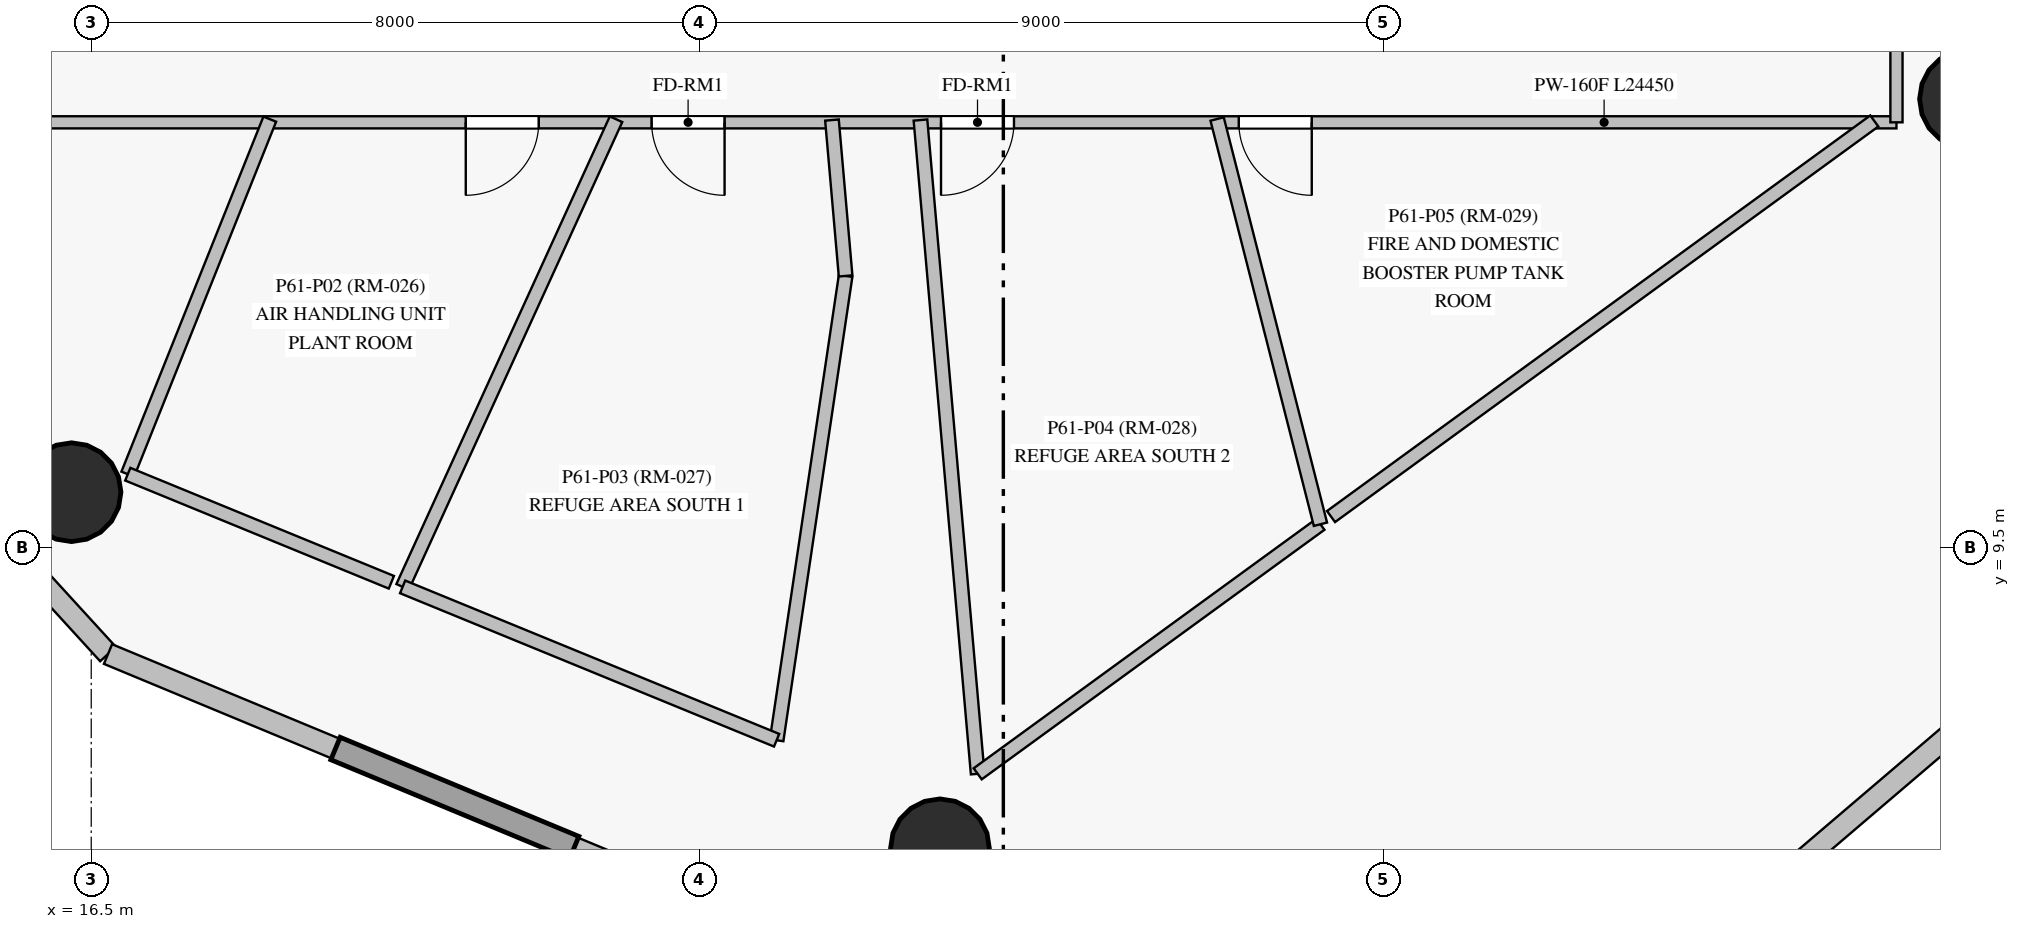
"""IFC4 building model, lengths in metres.
Left out: names, types, materials, properties, quantities, classifications, styles, units other than length and angle.
Written with IfcOpenShell. Run it as: python <this file> out.ifc"""

import sys

from ifc_helpers import new_model, si_unit, direction, frame, frame_2d, origin, origin_with_axes, origin_2d, place, context, subcontext, project, spatial, rectangle, circle, extrude, source, transform, mapped, element, fill, save


model = new_model("IFC4")
c1 = context("Model", 3, precision=1e-05, world=origin(), true_north=direction((0.0, 1.0)))
c2 = subcontext(c1, "Body", "Model", "MODEL_VIEW")
j1 = project(units=[si_unit("LENGTHUNIT", "METRE"), si_unit("PLANEANGLEUNIT", "RADIAN")], contexts=[c1])
p1 = place(None, origin())
s1 = spatial("IfcSite", under=j1, at=p1, CompositionType="ELEMENT")
p2 = place(p1, origin())
s2 = spatial("IfcBuilding", under=s1, at=p2, CompositionType="ELEMENT")
p3 = place(p2, frame((0.0, 0.0, 208.4)))
s3 = spatial("IfcBuildingStorey", under=s2, at=p3, CompositionType="ELEMENT", Elevation=208.4)
m1 = source(origin_with_axes(), c2, "Body", "SweptSolid", [
    extrude(circle(Radius=0.65, at=origin_2d()), origin(), (0.0, 0.0, 1.0), 4.5),
])
for number, where, z_axis, x_axis in (
    (1, (16.241, 10.234, 0.0), (0.0, 0.0, 1.0), (1.0, 0.0, 0.0)),
    (2, (27.666, 5.549, 0.0), (0.0, 0.0, 1.0), (1.0, 0.0, 0.0)),
    (3, (41.204, 15.406, 0.0), (0.0, 0.0, 1.0), (1.0, 0.0, 0.0)),
):
    element("IfcColumn", number, at=place(p3, frame(where, z_axis=z_axis, x_axis=x_axis)), inside=s3, PredefinedType="COLUMN", context=c2, shape_type="MappedRepresentation", body=[
        mapped(m1, transform((0.0, 0.0, 0.0), scale=1.0)),
    ])
p4 = place(p3, frame((7.677, 18.0, 0.0), z_axis=(0.0, 0.0, 1.0), x_axis=(0.674632867411, -0.738153435411, 0.0)))
e4 = element("IfcWall", 4, at=p4, inside=s3, PredefinedType="SOLIDWALL", context=c2, shape_type="SweptSolid", body=[
    extrude(rectangle(XDim=13.406, YDim=0.28, at=frame_2d((6.703, 0.0))), origin(), (0.0, 0.0, 1.0), 3.97),
])
p5 = place(p3, frame((16.721, 8.104, 0.0), z_axis=(0.0, 0.0, 1.0), x_axis=(0.923562279811, -0.383448451959, 0.0)))
e5 = element("IfcWall", 5, at=p5, inside=s3, PredefinedType="SOLIDWALL", context=c2, shape_type="SweptSolid", body=[
    extrude(rectangle(XDim=9.882, YDim=0.28, at=frame_2d((4.941, 0.0))), origin(), (0.0, 0.0, 1.0), 4.3),
])
p6 = place(p3, frame((38.697, 5.121, 0.0), z_axis=(0.0, 0.0, 1.0), x_axis=(0.760789005897, 0.64899929777, 0.0)))
e6 = element("IfcWall", 6, at=p6, inside=s3, PredefinedType="SOLIDWALL", context=c2, shape_type="SweptSolid", body=[
    extrude(rectangle(XDim=9.86, YDim=0.28, at=frame_2d((4.93, 0.0))), origin(), (0.0, 0.0, 1.0), 4.3),
])
p7 = place(p3, frame((40.25, 15.1, 0.0), z_axis=(0.0, 0.0, 1.0), x_axis=(-1.0, 0.0, 0.0)))
e7 = element("IfcWall", 7, at=p7, inside=s3, PredefinedType="PARTITIONING", context=c2, shape_type="SweptSolid", body=[
    extrude(rectangle(XDim=24.45, YDim=0.16, at=frame_2d((12.225, 0.0))), origin(), (0.0, 0.0, 1.0), 3.0),
])
p8 = place(p7, frame((15.417, 0.0, 0.0)))
e8 = element("IfcOpeningElement", 8, at=p8, cuts=e7, PredefinedType="OPENING", context=c2, shape_type="SweptSolid", body=[
    extrude(rectangle(XDim=0.96, YDim=2.15, at=frame_2d((0.48, 1.075))), frame((0.0, 0.09, 0.0), z_axis=(0.0, -1.0, 0.0), x_axis=(1.0, 0.0, 0.0)), (0.0, 0.0, 1.0), 0.18),
])
p9 = place(p7, frame((11.61, 0.0, 0.0)))
e9 = element("IfcOpeningElement", 9, at=p9, cuts=e7, PredefinedType="OPENING", context=c2, shape_type="SweptSolid", body=[
    extrude(rectangle(XDim=0.96, YDim=2.15, at=frame_2d((0.48, 1.075))), frame((0.0, 0.09, 0.0), z_axis=(0.0, -1.0, 0.0), x_axis=(1.0, 0.0, 0.0)), (0.0, 0.0, 1.0), 0.18),
])
p10 = place(p7, frame((17.863, 0.0, 0.0)))
e10 = element("IfcOpeningElement", 10, at=p10, cuts=e7, PredefinedType="OPENING", context=c2, shape_type="SweptSolid", body=[
    extrude(rectangle(XDim=0.96, YDim=2.15, at=frame_2d((0.48, 1.075))), frame((0.0, 0.09, 0.0), z_axis=(0.0, -1.0, 0.0), x_axis=(1.0, 0.0, 0.0)), (0.0, 0.0, 1.0), 0.18),
])
p11 = place(p7, frame((7.692, 0.0, 0.0)))
e11 = element("IfcOpeningElement", 11, at=p11, cuts=e7, PredefinedType="OPENING", context=c2, shape_type="SweptSolid", body=[
    extrude(rectangle(XDim=0.96, YDim=2.15, at=frame_2d((0.48, 1.075))), frame((0.0, 0.09, 0.0), z_axis=(0.0, -1.0, 0.0), x_axis=(1.0, 0.0, 0.0)), (0.0, 0.0, 1.0), 0.18),
])
p12 = place(p3, frame((40.25, 38.1, 0.0), z_axis=(0.0, 0.0, 1.0), x_axis=(0.0, -1.0, 0.0)))
e12 = element("IfcWall", 12, at=p12, inside=s3, PredefinedType="PARTITIONING", context=c2, shape_type="SweptSolid", body=[
    extrude(rectangle(XDim=23.0, YDim=0.16, at=frame_2d((11.5, 0.0))), origin(), (0.0, 0.0, 1.0), 3.0),
])
p13 = place(p3, frame((39.958, 15.118, 0.0), z_axis=(0.0, 0.0, 1.0), x_axis=(-0.808425512076, -0.58859849764, 0.0)))
e13 = element("IfcWall", 13, at=p13, inside=s3, PredefinedType="PARTITIONING", context=c2, shape_type="SweptSolid", body=[
    extrude(rectangle(XDim=8.842, YDim=0.18, at=frame_2d((4.421, 0.0))), origin(), (0.0, 0.0, 1.0), 3.0),
])
p14 = place(p3, frame((28.163, 6.529, 0.0), z_axis=(0.0, 0.0, 1.0), x_axis=(-0.087207991911, 0.996190125502, 0.0)))
e14 = element("IfcWall", 14, at=p14, inside=s3, PredefinedType="PARTITIONING", context=c2, shape_type="SweptSolid", body=[
    extrude(rectangle(XDim=8.634, YDim=0.18, at=frame_2d((4.317, 0.0))), origin(), (0.0, 0.0, 1.0), 2.8),
])
p15 = place(p3, frame((20.597, 8.988, 0.0), z_axis=(0.0, 0.0, 1.0), x_axis=(0.415148820151, 0.90975351449, 0.0)))
e15 = element("IfcWall", 15, at=p15, inside=s3, PredefinedType="PARTITIONING", context=c2, shape_type="SweptSolid", body=[
    extrude(rectangle(XDim=6.763, YDim=0.18, at=frame_2d((3.381, 0.0))), origin(), (0.0, 0.0, 1.0), 4.3),
])
p16 = place(p3, frame((26.425, 13.079, 0.0), z_axis=(0.0, 0.0, 1.0), x_axis=(-0.146987075097, -0.989138412839, 0.0)))
e16 = element("IfcWall", 16, at=p16, inside=s3, PredefinedType="PARTITIONING", context=c2, shape_type="SweptSolid", body=[
    extrude(rectangle(XDim=6.176, YDim=0.18, at=frame_2d((3.088, 0.0))), origin(), (0.0, 0.0, 1.0), 2.8),
])
p17 = place(p3, frame((32.672, 9.812, 0.0), z_axis=(0.0, 0.0, 1.0), x_axis=(-0.8084236517, -0.588601052813, 0.0)))
e17 = element("IfcWall", 17, at=p17, inside=s3, PredefinedType="PARTITIONING", context=c2, shape_type="SweptSolid", body=[
    extrude(rectangle(XDim=5.578, YDim=0.18, at=frame_2d((2.789, 0.0))), origin(), (0.0, 0.0, 1.0), 3.4),
])
p18 = place(p3, frame((31.312, 15.144, 0.0), z_axis=(0.0, 0.0, 1.0), x_axis=(0.247022495329, -0.969009745463, 0.0)))
e18 = element("IfcWall", 18, at=p18, inside=s3, PredefinedType="PARTITIONING", context=c2, shape_type="SweptSolid", body=[
    extrude(rectangle(XDim=5.502, YDim=0.18, at=frame_2d((2.751, 0.0))), origin(), (0.0, 0.0, 1.0), 4.3),
])
p19 = place(p3, frame((25.517, 6.971, 0.0), z_axis=(0.0, 0.0, 1.0), x_axis=(-0.925231438557, 0.379403195962, 0.0)))
e19 = element("IfcWall", 19, at=p19, inside=s3, PredefinedType="PARTITIONING", context=c2, shape_type="SweptSolid", body=[
    extrude(rectangle(XDim=5.318, YDim=0.18, at=frame_2d((2.659, 0.0))), origin(), (0.0, 0.0, 1.0), 3.4),
])
p20 = place(p3, frame((16.981, 10.471, 0.0), z_axis=(0.0, 0.0, 1.0), x_axis=(0.371357206638, 0.928490078072, 0.0)))
e20 = element("IfcWall", 20, at=p20, inside=s3, PredefinedType="PARTITIONING", context=c2, shape_type="SweptSolid", body=[
    extrude(rectangle(XDim=5.031, YDim=0.18, at=frame_2d((2.515, 0.0))), origin(), (0.0, 0.0, 1.0), 2.8),
])
p21 = place(p3, frame((20.449, 9.049, 0.0), z_axis=(0.0, 0.0, 1.0), x_axis=(-0.925243674006, 0.379373356619, 0.0)))
e21 = element("IfcWall", 21, at=p21, inside=s3, PredefinedType="PARTITIONING", context=c2, shape_type="SweptSolid", body=[
    extrude(rectangle(XDim=3.748, YDim=0.18, at=frame_2d((1.874, 0.0))), origin(), (0.0, 0.0, 1.0), 3.4),
])
p22 = place(p3, frame((26.245, 15.13, 0.0), z_axis=(0.0, 0.0, 1.0), x_axis=(0.087166950281, -0.996193717496, 0.0)))
e22 = element("IfcWall", 22, at=p22, inside=s3, PredefinedType="PARTITIONING", context=c2, shape_type="SweptSolid", body=[
    extrude(rectangle(XDim=2.059, YDim=0.18, at=frame_2d((1.029, 0.0))), origin(), (0.0, 0.0, 1.0), 2.8),
])
m2 = source(origin_with_axes(), c2, "Body", "SweptSolid", [
    extrude(rectangle(XDim=0.96, YDim=2.15, at=frame_2d((0.48, 1.075))), frame((0.0, 0.025, 0.0), z_axis=(0.0, -1.0, 0.0), x_axis=(1.0, 0.0, 0.0)), (0.0, 0.0, 1.0), 0.05),
])
p23 = place(p8, origin())
e23 = element("IfcDoor", 23, at=p23, inside=s3, OperationType="SINGLE_SWING_LEFT", PredefinedType="DOOR", context=c2, shape_type="MappedRepresentation", body=[
    mapped(m2, transform((0.0, 0.0, 0.0), scale=1.0)),
])
fill(e8, e23)
p24 = place(p9, origin())
e24 = element("IfcDoor", 24, at=p24, inside=s3, OperationType="SINGLE_SWING_RIGHT", PredefinedType="DOOR", context=c2, shape_type="MappedRepresentation", body=[
    mapped(m2, transform((0.0, 0.0, 0.0), scale=1.0)),
])
fill(e9, e24)
p25 = place(p10, origin())
e25 = element("IfcDoor", 25, at=p25, inside=s3, OperationType="SINGLE_SWING_RIGHT", PredefinedType="DOOR", context=c2, shape_type="MappedRepresentation", body=[
    mapped(m2, transform((0.0, 0.0, 0.0), scale=1.0)),
])
fill(e10, e25)
p26 = place(p11, origin())
e26 = element("IfcDoor", 26, at=p26, inside=s3, OperationType="SINGLE_SWING_LEFT", PredefinedType="DOOR", context=c2, shape_type="MappedRepresentation", body=[
    mapped(m2, transform((0.0, 0.0, 0.0), scale=1.0)),
])
fill(e11, e26)
save(model, sys.argv[1])
